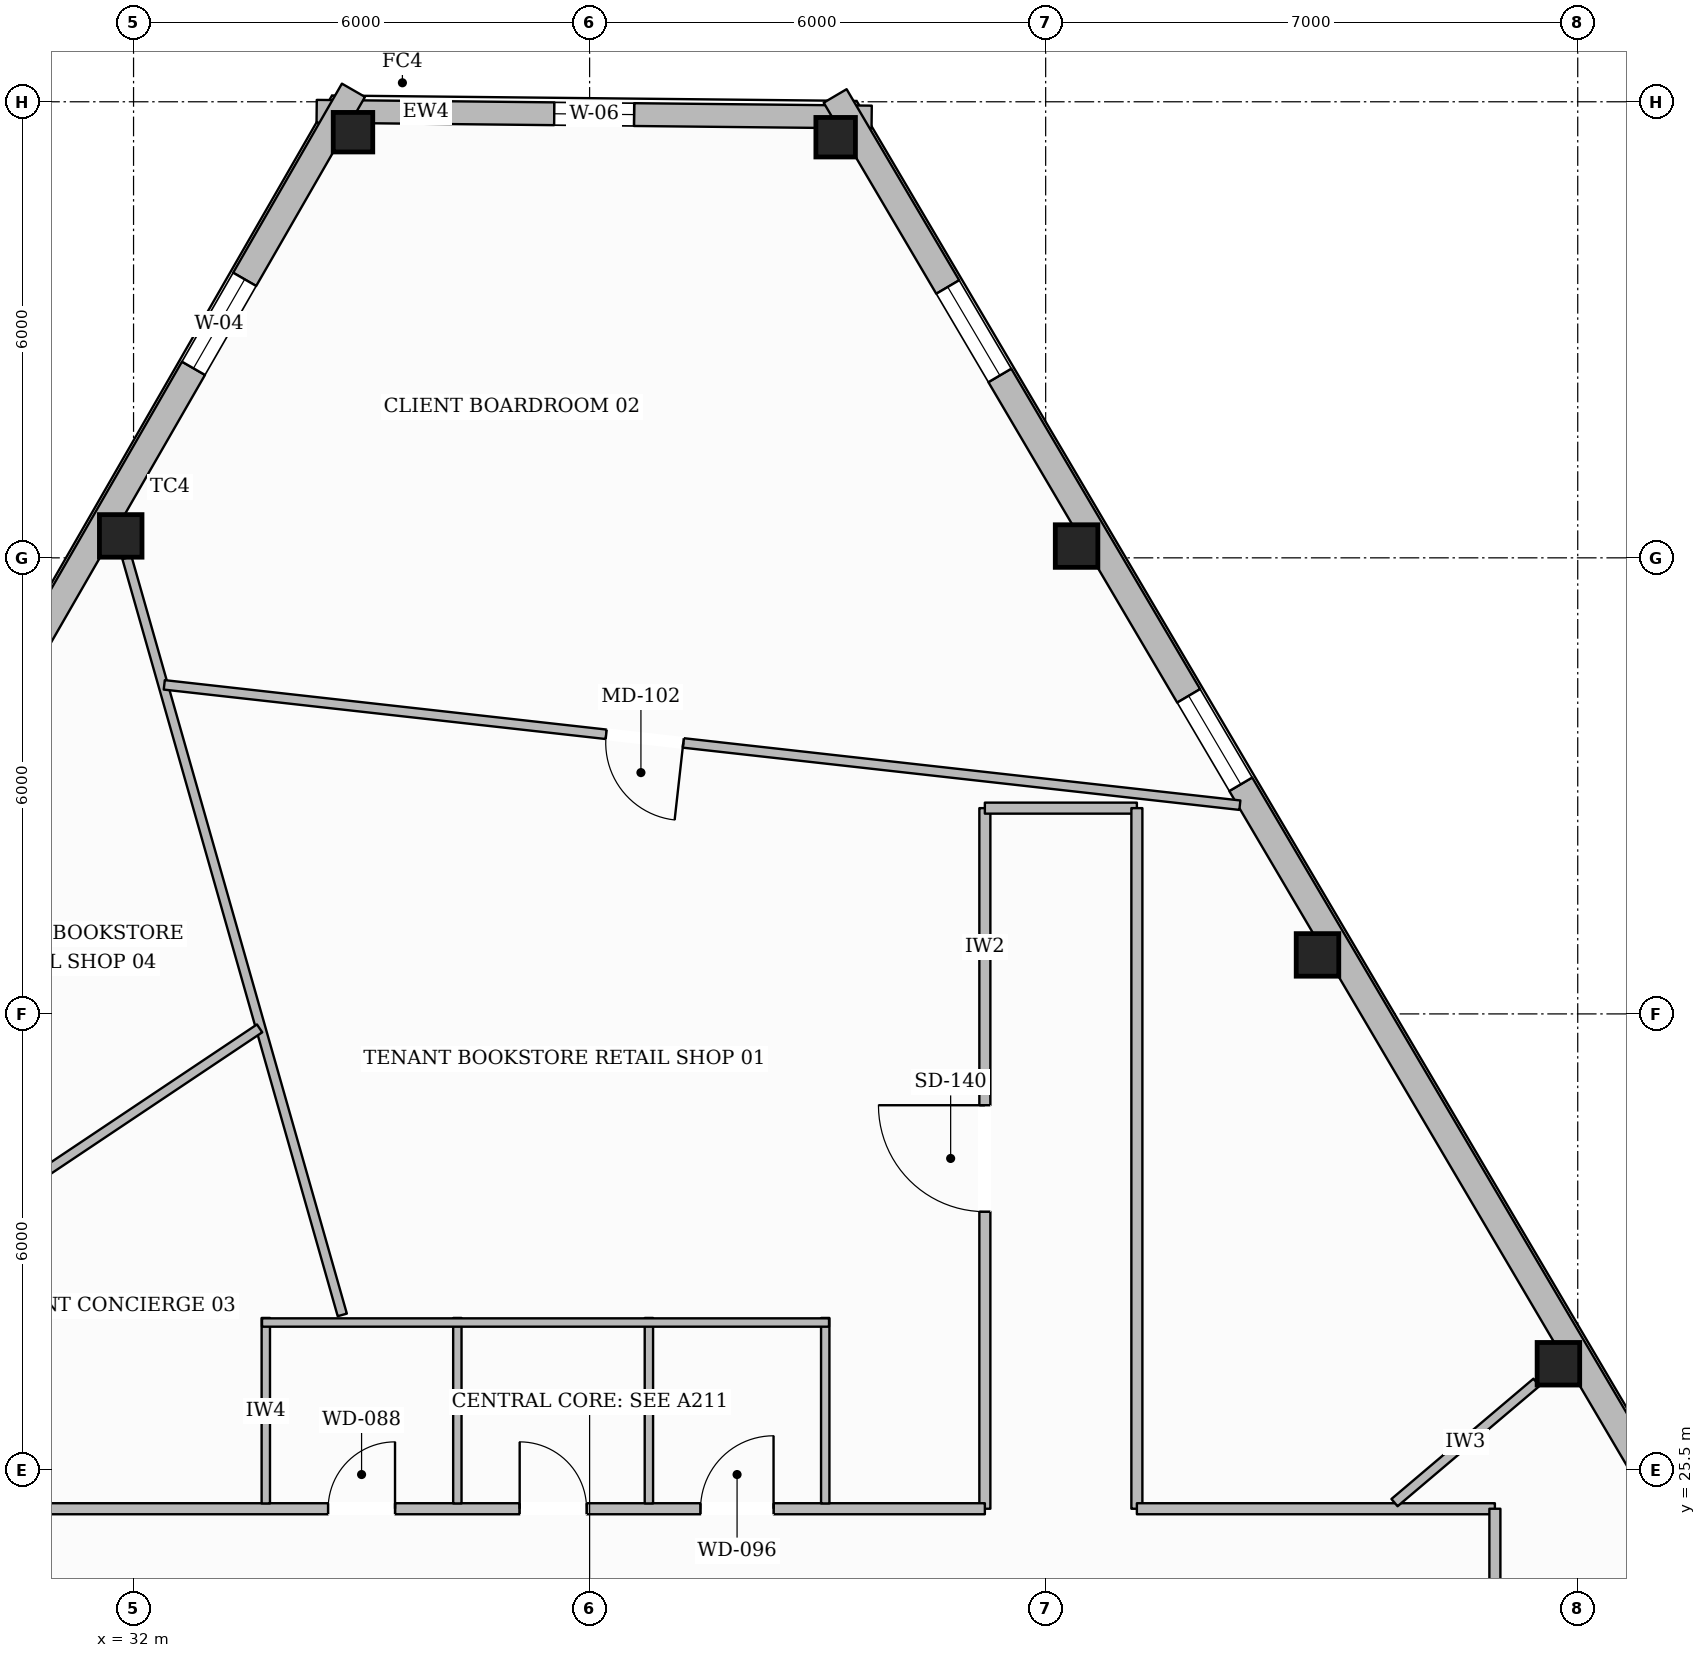
"""IFC4 building model, lengths in metres.
Left out: names, types, materials, properties, quantities, classifications, styles, units other than length and angle.
Written with IfcOpenShell. Run it as: python <this file> out.ifc"""

import sys

from ifc_helpers import new_model, si_unit, direction, frame, frame_2d, origin, origin_2d, place, context, subcontext, project, spatial, rectangle, hollow_rectangle, extrude, element, fill, save


model = new_model("IFC4")
c1 = context("Model", 3, precision=1e-05, world=origin(), true_north=direction((0.0, 1.0)))
c2 = subcontext(c1, "Body", "Model", "MODEL_VIEW")
j1 = project(units=[si_unit("LENGTHUNIT", "METRE"), si_unit("PLANEANGLEUNIT", "RADIAN")], contexts=[c1])
p1 = place(None, origin())
s1 = spatial("IfcSite", under=j1, at=p1, CompositionType="ELEMENT")
p2 = place(p1, origin())
s2 = spatial("IfcBuilding", under=s1, at=p2, CompositionType="ELEMENT")
p3 = place(p2, frame((0.0, 0.0, 262.6)))
s3 = spatial("IfcBuildingStorey", under=s2, at=p3, CompositionType="ELEMENT", Elevation=262.6)
p4 = place(p3, frame((34.887, 43.1, 0.0), z_axis=(0.0, 0.0, 1.0), x_axis=(1.0, 0.0, 0.0)))
e1 = element("IfcColumn", 1, at=p4, inside=s3, PredefinedType="COLUMN", context=c2, shape_type="SweptSolid", body=[
    extrude(hollow_rectangle(XDim=0.52, YDim=0.52, WallThickness=0.024, at=origin_2d()), origin(), (0.0, 0.0, 1.0), 3.61),
])
for number, where, z_axis, x_axis in (
    (2, (31.831, 37.789, 0.0), (0.0, 0.0, 1.0), (1.0, 0.0, 0.0)),
    (3, (50.746, 26.897, 0.0), (0.0, 0.0, 1.0), (1.0, 0.0, 0.0)),
    (4, (47.576, 32.276, 0.0), (0.0, 0.0, 1.0), (1.0, 0.0, 0.0)),
    (5, (44.406, 37.655, 0.0), (0.0, 0.0, 1.0), (1.0, 0.0, 0.0)),
):
    element("IfcColumn", number, at=place(p3, frame(where, z_axis=z_axis, x_axis=x_axis)), inside=s3, PredefinedType="COLUMN", context=c2, shape_type="SweptSolid", body=[
        extrude(hollow_rectangle(XDim=0.56, YDim=0.56, WallThickness=0.025, at=origin_2d()), origin(), (0.0, 0.0, 1.0), 3.61),
    ])
p5 = place(p3, frame((41.237, 43.034, 0.0), z_axis=(0.0, 0.0, 1.0), x_axis=(1.0, 0.0, 0.0)))
e6 = element("IfcColumn", 6, at=p5, inside=s3, PredefinedType="COLUMN", context=c2, shape_type="SweptSolid", body=[
    extrude(hollow_rectangle(XDim=0.52, YDim=0.52, WallThickness=0.024, at=origin_2d()), origin(), (0.0, 0.0, 1.0), 3.61),
])
p6 = place(p3, frame((34.409, 43.375, 0.0), z_axis=(0.0, 0.0, 1.0), x_axis=(0.999945939405, -0.010397993418, 0.0)))
e7 = element("IfcWall", 7, at=p6, inside=s3, PredefinedType="STANDARD", context=c2, shape_type="SweptSolid", body=[
    extrude(rectangle(XDim=7.302, YDim=0.3, at=frame_2d((3.651, 0.0))), origin(), (0.0, 0.0, 1.0), 3.196),
])
p7 = place(p6, frame((3.126, 0.0, 0.65)))
e8 = element("IfcOpeningElement", 8, at=p7, cuts=e7, PredefinedType="OPENING", context=c2, shape_type="SweptSolid", body=[
    extrude(rectangle(XDim=1.05, YDim=1.7, at=frame_2d((0.525, 0.85))), frame((0.0, 0.16, 0.0), z_axis=(0.0, -1.0, 0.0), x_axis=(1.0, 0.0, 0.0)), (0.0, 0.0, 1.0), 0.32),
])
p8 = place(p3, frame((16.079, 10.951, 0.0), z_axis=(0.0, 0.0, 1.0), x_axis=(0.498709777088, 0.866769033963, 0.0)))
e9 = element("IfcWall", 9, at=p8, inside=s3, PredefinedType="STANDARD", context=c2, shape_type="SweptSolid", body=[
    extrude(rectangle(XDim=37.726, YDim=0.35, at=frame_2d((18.863, 0.0))), origin(), (0.0, 0.0, 1.0), 3.196),
])
p9 = place(p8, frame((9.031, 0.0, 0.0)))
e10 = element("IfcOpeningElement", 10, at=p9, cuts=e9, PredefinedType="OPENING", context=c2, shape_type="SweptSolid", body=[
    extrude(rectangle(XDim=1.0, YDim=2.2, at=frame_2d((0.5, 1.1))), frame((0.0, 0.185, 0.0), z_axis=(0.0, -1.0, 0.0), x_axis=(1.0, 0.0, 0.0)), (0.0, 0.0, 1.0), 0.37),
])
p10 = place(p8, frame((33.506, 0.0, 0.65)))
e11 = element("IfcOpeningElement", 11, at=p10, cuts=e9, PredefinedType="OPENING", context=c2, shape_type="SweptSolid", body=[
    extrude(rectangle(XDim=1.35, YDim=1.75, at=frame_2d((0.675, 0.875))), frame((0.0, 0.185, 0.0), z_axis=(0.0, -1.0, 0.0), x_axis=(1.0, 0.0, 0.0)), (0.0, 0.0, 1.0), 0.37),
])
p11 = place(p8, frame((27.379, 0.0, 0.65)))
e12 = element("IfcOpeningElement", 12, at=p11, cuts=e9, PredefinedType="OPENING", context=c2, shape_type="SweptSolid", body=[
    extrude(rectangle(XDim=1.35, YDim=1.75, at=frame_2d((0.675, 0.875))), frame((0.0, 0.185, 0.0), z_axis=(0.0, -1.0, 0.0), x_axis=(1.0, 0.0, 0.0)), (0.0, 0.0, 1.0), 0.37),
])
p12 = place(p8, frame((21.251, 0.0, 0.65)))
e13 = element("IfcOpeningElement", 13, at=p12, cuts=e9, PredefinedType="OPENING", context=c2, shape_type="SweptSolid", body=[
    extrude(rectangle(XDim=1.35, YDim=1.75, at=frame_2d((0.675, 0.875))), frame((0.0, 0.185, 0.0), z_axis=(0.0, -1.0, 0.0), x_axis=(1.0, 0.0, 0.0)), (0.0, 0.0, 1.0), 0.37),
])
p13 = place(p8, frame((2.868, 0.0, 0.65)))
e14 = element("IfcOpeningElement", 14, at=p13, cuts=e9, PredefinedType="OPENING", context=c2, shape_type="SweptSolid", body=[
    extrude(rectangle(XDim=1.35, YDim=1.75, at=frame_2d((0.675, 0.875))), frame((0.0, 0.185, 0.0), z_axis=(0.0, -1.0, 0.0), x_axis=(1.0, 0.0, 0.0)), (0.0, 0.0, 1.0), 0.37),
])
p14 = place(p3, frame((41.23, 43.577, 0.0), z_axis=(0.0, 0.0, 1.0), x_axis=(0.507689696002, -0.861540000565, 0.0)))
e15 = element("IfcWall", 15, at=p14, inside=s3, PredefinedType="STANDARD", context=c2, shape_type="SweptSolid", body=[
    extrude(rectangle(XDim=38.41, YDim=0.35, at=frame_2d((19.205, 0.0))), origin(), (0.0, 0.0, 1.0), 3.196),
])
p15 = place(p14, frame((34.134, 0.0, 0.65)))
e16 = element("IfcOpeningElement", 16, at=p15, cuts=e15, PredefinedType="OPENING", context=c2, shape_type="SweptSolid", body=[
    extrude(rectangle(XDim=1.35, YDim=1.75, at=frame_2d((0.675, 0.875))), frame((0.0, 0.185, 0.0), z_axis=(0.0, -1.0, 0.0), x_axis=(1.0, 0.0, 0.0)), (0.0, 0.0, 1.0), 0.37),
])
p16 = place(p14, frame((27.89, 0.0, 0.65)))
e17 = element("IfcOpeningElement", 17, at=p16, cuts=e15, PredefinedType="OPENING", context=c2, shape_type="SweptSolid", body=[
    extrude(rectangle(XDim=1.35, YDim=1.75, at=frame_2d((0.675, 0.875))), frame((0.0, 0.185, 0.0), z_axis=(0.0, -1.0, 0.0), x_axis=(1.0, 0.0, 0.0)), (0.0, 0.0, 1.0), 0.37),
])
p17 = place(p14, frame((21.647, 0.0, 0.65)))
e18 = element("IfcOpeningElement", 18, at=p17, cuts=e15, PredefinedType="OPENING", context=c2, shape_type="SweptSolid", body=[
    extrude(rectangle(XDim=1.35, YDim=1.75, at=frame_2d((0.675, 0.875))), frame((0.0, 0.185, 0.0), z_axis=(0.0, -1.0, 0.0), x_axis=(1.0, 0.0, 0.0)), (0.0, 0.0, 1.0), 0.37),
])
p18 = place(p14, frame((9.161, 0.0, 0.65)))
e19 = element("IfcOpeningElement", 19, at=p18, cuts=e15, PredefinedType="OPENING", context=c2, shape_type="SweptSolid", body=[
    extrude(rectangle(XDim=1.35, YDim=1.75, at=frame_2d((0.675, 0.875))), frame((0.0, 0.185, 0.0), z_axis=(0.0, -1.0, 0.0), x_axis=(1.0, 0.0, 0.0)), (0.0, 0.0, 1.0), 0.37),
])
p19 = place(p14, frame((2.917, 0.0, 0.65)))
e20 = element("IfcOpeningElement", 20, at=p19, cuts=e15, PredefinedType="OPENING", context=c2, shape_type="SweptSolid", body=[
    extrude(rectangle(XDim=1.35, YDim=1.75, at=frame_2d((0.675, 0.875))), frame((0.0, 0.185, 0.0), z_axis=(0.0, -1.0, 0.0), x_axis=(1.0, 0.0, 0.0)), (0.0, 0.0, 1.0), 0.37),
])
p20 = place(p3, frame((43.2, 24.99, 0.0), z_axis=(0.0, 0.0, 1.0), x_axis=(0.0, 1.0, 0.0)))
e21 = element("IfcWall", 21, at=p20, inside=s3, PredefinedType="PARTITIONING", context=c2, shape_type="SweptSolid", body=[
    extrude(rectangle(XDim=9.217, YDim=0.145, at=frame_2d((4.608, 0.0))), origin(), (0.0, 0.0, 1.0), 3.61),
])
p21 = place(p20, frame((3.908, 0.0, 0.0)))
e22 = element("IfcOpeningElement", 22, at=p21, cuts=e21, PredefinedType="OPENING", context=c2, shape_type="SweptSolid", body=[
    extrude(rectangle(XDim=1.4, YDim=2.2, at=frame_2d((0.7, 1.1))), frame((0.0, 0.083, 0.0), z_axis=(0.0, -1.0, 0.0), x_axis=(1.0, 0.0, 0.0)), (0.0, 0.0, 1.0), 0.165),
])
p22 = place(p3, frame((43.2, 34.207, 0.0), z_axis=(0.0, 0.0, 1.0), x_axis=(1.0, 0.0, 0.0)))
e23 = element("IfcWall", 23, at=p22, inside=s3, PredefinedType="PARTITIONING", context=c2, shape_type="SweptSolid", body=[
    extrude(rectangle(XDim=2.0, YDim=0.145, at=frame_2d((1.0, 0.0))), origin(), (0.0, 0.0, 1.0), 3.61),
])
p23 = place(p3, frame((45.2, 34.207, 0.0), z_axis=(0.0, 0.0, 1.0), x_axis=(0.0, -1.0, 0.0)))
e24 = element("IfcWall", 24, at=p23, inside=s3, PredefinedType="PARTITIONING", context=c2, shape_type="SweptSolid", body=[
    extrude(rectangle(XDim=9.217, YDim=0.145, at=frame_2d((4.608, 0.0))), origin(), (0.0, 0.0, 1.0), 3.61),
])
p24 = place(p3, frame((45.2, 24.99, 0.0), z_axis=(0.0, 0.0, 1.0), x_axis=(1.0, 0.0, 0.0)))
e25 = element("IfcWall", 25, at=p24, inside=s3, PredefinedType="PARTITIONING", context=c2, shape_type="SweptSolid", body=[
    extrude(rectangle(XDim=4.71, YDim=0.145, at=frame_2d((2.355, 0.0))), origin(), (0.0, 0.0, 1.0), 3.61),
])
p25 = place(p3, frame((49.91, 24.99, 0.0), z_axis=(0.0, 0.0, 1.0), x_axis=(0.0, -1.0, 0.0)))
e26 = element("IfcWall", 26, at=p25, inside=s3, PredefinedType="PARTITIONING", context=c2, shape_type="SweptSolid", body=[
    extrude(rectangle(XDim=7.34, YDim=0.145, at=frame_2d((3.67, 0.0))), origin(), (0.0, 0.0, 1.0), 3.349),
])
p26 = place(p25, frame((2.97, 0.0, 0.0)))
e27 = element("IfcOpeningElement", 27, at=p26, cuts=e26, PredefinedType="OPENING", context=c2, shape_type="SweptSolid", body=[
    extrude(rectangle(XDim=1.4, YDim=2.2, at=frame_2d((0.7, 1.1))), frame((0.0, 0.083, 0.0), z_axis=(0.0, -1.0, 0.0), x_axis=(1.0, 0.0, 0.0)), (0.0, 0.0, 1.0), 0.165),
])
p27 = place(p3, frame((26.09, 24.99, 0.0), z_axis=(0.0, 0.0, 1.0), x_axis=(1.0, 0.0, 0.0)))
e28 = element("IfcWall", 28, at=p27, inside=s3, PredefinedType="PARTITIONING", context=c2, shape_type="SweptSolid", body=[
    extrude(rectangle(XDim=17.11, YDim=0.145, at=frame_2d((8.555, 0.0))), origin(), (0.0, 0.0, 1.0), 3.61),
])
p28 = place(p27, frame((8.47, 0.0, 0.0)))
e29 = element("IfcOpeningElement", 29, at=p28, cuts=e28, PredefinedType="OPENING", context=c2, shape_type="SweptSolid", body=[
    extrude(rectangle(XDim=0.88, YDim=2.1, at=frame_2d((0.44, 1.05))), frame((0.0, 0.083, 0.0), z_axis=(0.0, -1.0, 0.0), x_axis=(1.0, 0.0, 0.0)), (0.0, 0.0, 1.0), 0.165),
])
p29 = place(p27, frame((10.99, 0.0, 0.0)))
e30 = element("IfcOpeningElement", 30, at=p29, cuts=e28, PredefinedType="OPENING", context=c2, shape_type="SweptSolid", body=[
    extrude(rectangle(XDim=0.88, YDim=2.1, at=frame_2d((0.44, 1.05))), frame((0.0, 0.083, 0.0), z_axis=(0.0, -1.0, 0.0), x_axis=(1.0, 0.0, 0.0)), (0.0, 0.0, 1.0), 0.165),
])
p30 = place(p27, frame((13.37, 0.0, 0.0)))
e31 = element("IfcOpeningElement", 31, at=p30, cuts=e28, PredefinedType="OPENING", context=c2, shape_type="SweptSolid", body=[
    extrude(rectangle(XDim=0.96, YDim=2.1, at=frame_2d((0.48, 1.05))), frame((0.0, 0.083, 0.0), z_axis=(0.0, -1.0, 0.0), x_axis=(1.0, 0.0, 0.0)), (0.0, 0.0, 1.0), 0.165),
])
p31 = place(p27, frame((3.426, 0.0, 0.0)))
e32 = element("IfcOpeningElement", 32, at=p31, cuts=e28, PredefinedType="OPENING", context=c2, shape_type="SweptSolid", body=[
    extrude(rectangle(XDim=0.98, YDim=2.15, at=frame_2d((0.49, 1.075))), frame((0.0, 0.083, 0.0), z_axis=(0.0, -1.0, 0.0), x_axis=(1.0, 0.0, 0.0)), (0.0, 0.0, 1.0), 0.165),
])
for number, where, z_axis, x_axis in (
    (33, (33.74, 25.06, 0.0), (0.0, 0.0, 1.0), (0.0, 1.0, 0.0)),
    (34, (36.26, 25.06, 0.0), (0.0, 0.0, 1.0), (0.0, 1.0, 0.0)),
    (35, (38.78, 25.06, 0.0), (0.0, 0.0, 1.0), (0.0, 1.0, 0.0)),
):
    element("IfcWall", number, at=place(p3, frame(where, z_axis=z_axis, x_axis=x_axis)), inside=s3, PredefinedType="PLUMBINGWALL", context=c2, shape_type="SweptSolid", body=[
        extrude(rectangle(XDim=2.44, YDim=0.11, at=frame_2d((1.22, 0.0))), origin(), (0.0, 0.0, 1.0), 3.61),
    ])
p32 = place(p3, frame((41.1, 25.06, 0.0), z_axis=(0.0, 0.0, 1.0), x_axis=(0.0, 1.0, 0.0)))
e36 = element("IfcWall", 36, at=p32, inside=s3, PredefinedType="PLUMBINGWALL", context=c2, shape_type="SweptSolid", body=[
    extrude(rectangle(XDim=2.44, YDim=0.11, at=frame_2d((1.22, 0.0))), origin(), (0.0, 0.0, 1.0), 3.246),
])
p33 = place(p3, frame((33.69, 27.44, 0.0), z_axis=(0.0, 0.0, 1.0), x_axis=(1.0, 0.0, 0.0)))
e37 = element("IfcWall", 37, at=p33, inside=s3, PredefinedType="PLUMBINGWALL", context=c2, shape_type="SweptSolid", body=[
    extrude(rectangle(XDim=7.46, YDim=0.11, at=frame_2d((3.73, 0.0))), origin(), (0.0, 0.0, 1.0), 3.61),
])
p34 = place(p3, frame((48.589, 25.071, 0.0), z_axis=(0.0, 0.0, 1.0), x_axis=(0.763023110228, 0.646371203921, 0.0)))
e38 = element("IfcWall", 38, at=p34, inside=s3, PredefinedType="PARTITIONING", context=c2, shape_type="SweptSolid", body=[
    extrude(rectangle(XDim=2.449, YDim=0.125, at=frame_2d((1.224, 0.0))), origin(), (0.0, 0.0, 1.0), 3.61),
])
p35 = place(p3, frame((34.746, 27.54, 0.0), z_axis=(0.0, 0.0, 1.0), x_axis=(-0.273575053809, 0.961850658852, 0.0)))
e39 = element("IfcWall", 39, at=p35, inside=s3, PredefinedType="PARTITIONING", context=c2, shape_type="SweptSolid", body=[
    extrude(rectangle(XDim=10.355, YDim=0.125, at=frame_2d((5.178, 0.0))), origin(), (0.0, 0.0, 1.0), 3.61),
])
p36 = place(p3, frame((46.555, 34.246, 0.0), z_axis=(0.0, 0.0, 1.0), x_axis=(-0.993798756506, 0.111193666942, 0.0)))
e40 = element("IfcWall", 40, at=p36, inside=s3, PredefinedType="PARTITIONING", context=c2, shape_type="SweptSolid", body=[
    extrude(rectangle(XDim=14.239, YDim=0.125, at=frame_2d((7.119, 0.0))), origin(), (0.0, 0.0, 1.0), 3.61),
])
p37 = place(p36, frame((7.368, 0.0, 0.0)))
e41 = element("IfcOpeningElement", 41, at=p37, cuts=e40, PredefinedType="OPENING", context=c2, shape_type="SweptSolid", body=[
    extrude(rectangle(XDim=1.02, YDim=2.15, at=frame_2d((0.51, 1.075))), frame((0.0, 0.073, 0.0), z_axis=(0.0, -1.0, 0.0), x_axis=(1.0, 0.0, 0.0)), (0.0, 0.0, 1.0), 0.145),
])
p38 = place(p3, frame((33.658, 31.31, 0.0), z_axis=(0.0, 0.0, 1.0), x_axis=(-0.831131874476, -0.556075361106, 0.0)))
e42 = element("IfcWall", 42, at=p38, inside=s3, PredefinedType="PARTITIONING", context=c2, shape_type="SweptSolid", body=[
    extrude(rectangle(XDim=11.138, YDim=0.125, at=frame_2d((5.569, 0.0))), origin(), (0.0, 0.0, 1.0), 3.199),
])
p39 = place(p38, frame((5.175, 0.0, 0.0)))
e43 = element("IfcOpeningElement", 43, at=p39, cuts=e42, PredefinedType="OPENING", context=c2, shape_type="SweptSolid", body=[
    extrude(rectangle(XDim=0.98, YDim=2.15, at=frame_2d((0.49, 1.075))), frame((0.0, 0.073, 0.0), z_axis=(0.0, -1.0, 0.0), x_axis=(1.0, 0.0, 0.0)), (0.0, 0.0, 1.0), 0.145),
])
p40 = place(p10, origin())
e44 = element("IfcWindow", 44, at=p40, inside=s3, PartitioningType="SINGLE_PANEL", PredefinedType="WINDOW", context=c2, shape_type="SweptSolid", body=[
    extrude(rectangle(XDim=1.35, YDim=1.75, at=frame_2d((0.675, 0.875))), frame((0.0, 0.03, 0.0), z_axis=(0.0, -1.0, 0.0), x_axis=(1.0, 0.0, 0.0)), (0.0, 0.0, 1.0), 0.06),
])
fill(e11, e44)
p41 = place(p18, origin())
e45 = element("IfcWindow", 45, at=p41, inside=s3, PartitioningType="SINGLE_PANEL", PredefinedType="WINDOW", context=c2, shape_type="SweptSolid", body=[
    extrude(rectangle(XDim=1.35, YDim=1.75, at=frame_2d((0.675, 0.875))), frame((0.0, 0.03, 0.0), z_axis=(0.0, -1.0, 0.0), x_axis=(1.0, 0.0, 0.0)), (0.0, 0.0, 1.0), 0.06),
])
fill(e19, e45)
p42 = place(p19, origin())
e46 = element("IfcWindow", 46, at=p42, inside=s3, PartitioningType="SINGLE_PANEL", PredefinedType="WINDOW", context=c2, shape_type="SweptSolid", body=[
    extrude(rectangle(XDim=1.35, YDim=1.75, at=frame_2d((0.675, 0.875))), frame((0.0, 0.03, 0.0), z_axis=(0.0, -1.0, 0.0), x_axis=(1.0, 0.0, 0.0)), (0.0, 0.0, 1.0), 0.06),
])
fill(e20, e46)
p43 = place(p7, origin())
e47 = element("IfcWindow", 47, at=p43, inside=s3, PartitioningType="SINGLE_PANEL", PredefinedType="WINDOW", context=c2, shape_type="SweptSolid", body=[
    extrude(rectangle(XDim=1.05, YDim=1.7, at=frame_2d((0.525, 0.85))), frame((0.0, 0.03, 0.0), z_axis=(0.0, -1.0, 0.0), x_axis=(1.0, 0.0, 0.0)), (0.0, 0.0, 1.0), 0.06),
])
fill(e8, e47)
p44 = place(p28, origin())
e48 = element("IfcDoor", 48, at=p44, inside=s3, OperationType="SINGLE_SWING_RIGHT", PredefinedType="DOOR", context=c2, shape_type="SweptSolid", body=[
    extrude(rectangle(XDim=0.88, YDim=2.1, at=frame_2d((0.44, 1.05))), frame((0.0, 0.025, 0.0), z_axis=(0.0, -1.0, 0.0), x_axis=(1.0, 0.0, 0.0)), (0.0, 0.0, 1.0), 0.05),
])
fill(e29, e48)
p45 = place(p29, origin())
e49 = element("IfcDoor", 49, at=p45, inside=s3, OperationType="SINGLE_SWING_LEFT", PredefinedType="DOOR", context=c2, shape_type="SweptSolid", body=[
    extrude(rectangle(XDim=0.88, YDim=2.1, at=frame_2d((0.44, 1.05))), frame((0.0, 0.025, 0.0), z_axis=(0.0, -1.0, 0.0), x_axis=(1.0, 0.0, 0.0)), (0.0, 0.0, 1.0), 0.05),
])
fill(e30, e49)
p46 = place(p30, origin())
e50 = element("IfcDoor", 50, at=p46, inside=s3, OperationType="SINGLE_SWING_RIGHT", PredefinedType="DOOR", context=c2, shape_type="SweptSolid", body=[
    extrude(rectangle(XDim=0.96, YDim=2.1, at=frame_2d((0.48, 1.05))), frame((0.0, 0.025, 0.0), z_axis=(0.0, -1.0, 0.0), x_axis=(1.0, 0.0, 0.0)), (0.0, 0.0, 1.0), 0.05),
])
fill(e31, e50)
p47 = place(p21, origin())
e51 = element("IfcDoor", 51, at=p47, inside=s3, OperationType="SINGLE_SWING_RIGHT", PredefinedType="DOOR", context=c2, shape_type="SweptSolid", body=[
    extrude(rectangle(XDim=1.4, YDim=2.2, at=frame_2d((0.7, 1.1))), frame((0.0, 0.025, 0.0), z_axis=(0.0, -1.0, 0.0), x_axis=(1.0, 0.0, 0.0)), (0.0, 0.0, 1.0), 0.05),
])
fill(e22, e51)
p48 = place(p37, origin())
e52 = element("IfcDoor", 52, at=p48, inside=s3, OperationType="SINGLE_SWING_LEFT", PredefinedType="DOOR", context=c2, shape_type="SweptSolid", body=[
    extrude(rectangle(XDim=1.02, YDim=2.15, at=frame_2d((0.51, 1.075))), frame((0.0, 0.025, 0.0), z_axis=(0.0, -1.0, 0.0), x_axis=(1.0, 0.0, 0.0)), (0.0, 0.0, 1.0), 0.05),
])
fill(e41, e52)
save(model, sys.argv[1])
